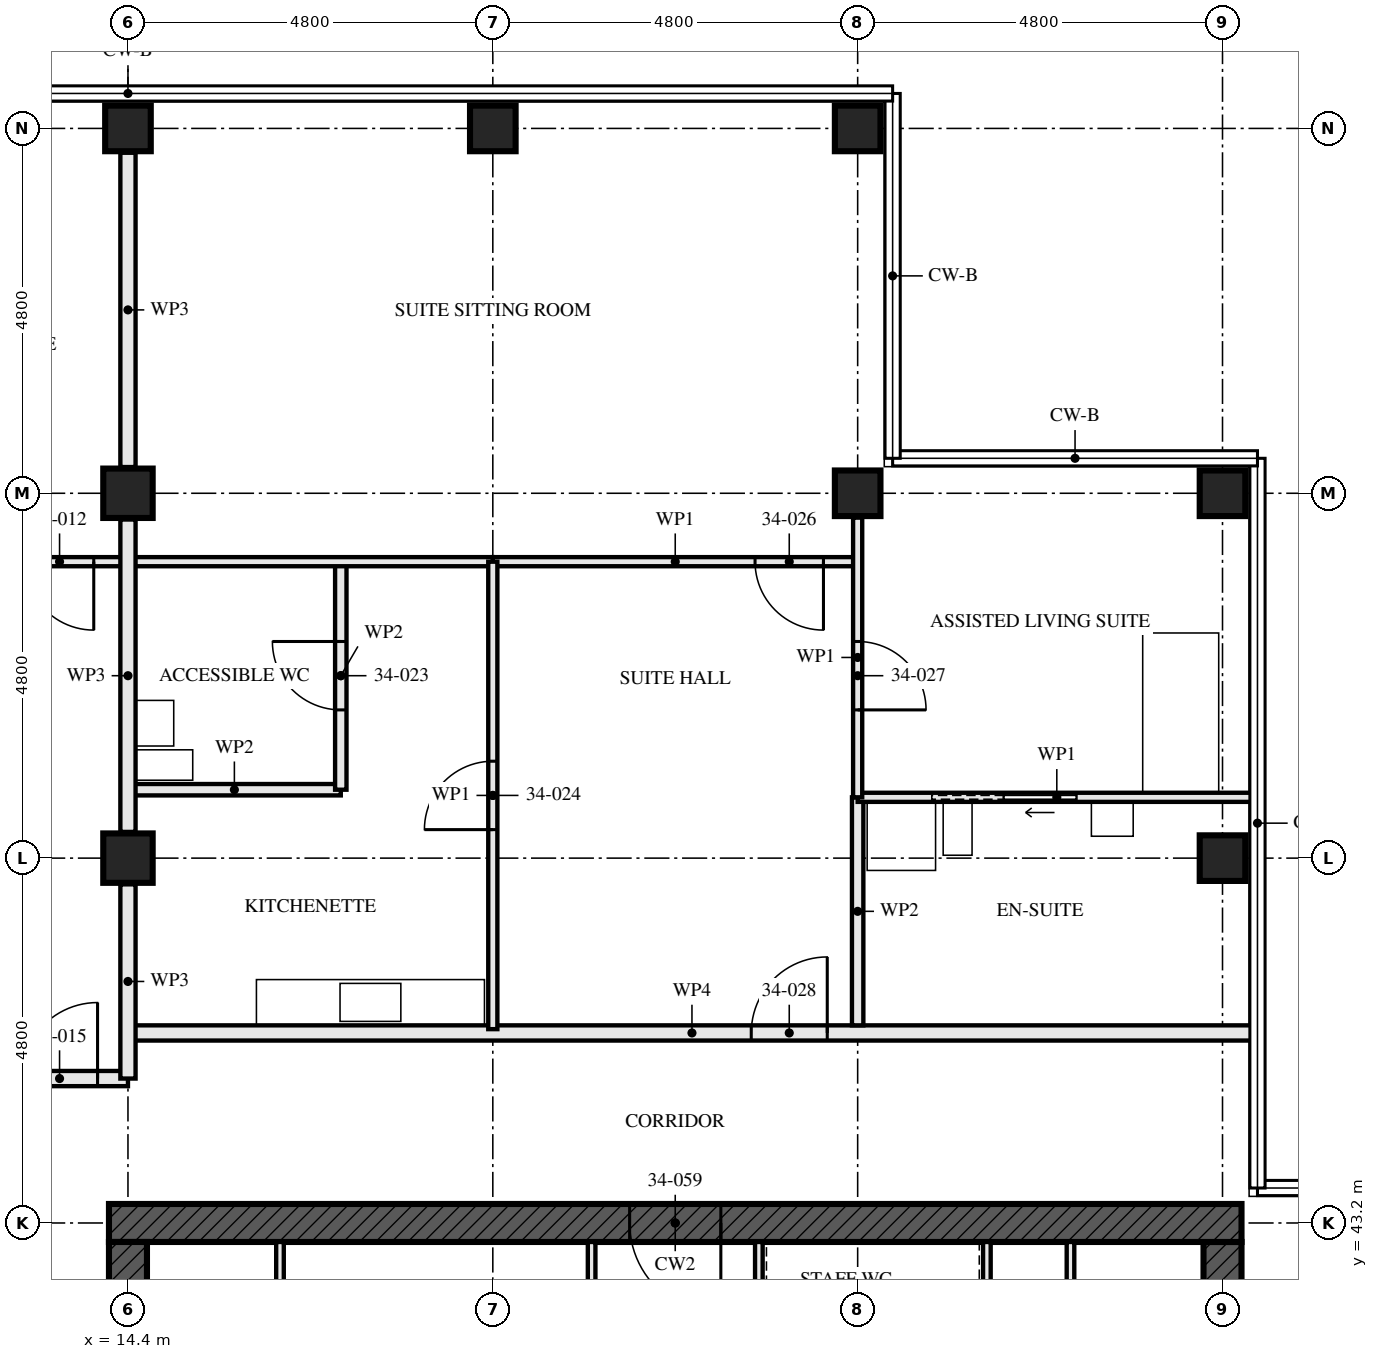
"""IFC4 building model, lengths in metres.
Left out: names, types, materials, properties, quantities, classifications, styles, units other than length and angle.
Written with IfcOpenShell. Run it as: python <this file> out.ifc"""

import sys

from ifc_helpers import new_model, si_unit, direction, frame, frame_2d, origin, origin_2d, place, context, subcontext, project, spatial, rectangle, hollow_rectangle, extrude, element, fill, save


model = new_model("IFC4")
c1 = context("Model", 3, precision=1e-05, world=origin(), true_north=direction((0.0, 1.0)))
c2 = subcontext(c1, "Body", "Model", "MODEL_VIEW")
j1 = project(units=[si_unit("LENGTHUNIT", "METRE"), si_unit("PLANEANGLEUNIT", "RADIAN")], contexts=[c1])
p1 = place(None, origin())
s1 = spatial("IfcSite", under=j1, at=p1, CompositionType="ELEMENT")
p2 = place(p1, origin())
s2 = spatial("IfcBuilding", under=s1, at=p2, CompositionType="ELEMENT")
p3 = place(p2, frame((0.0, 0.0, 126.0)))
s3 = spatial("IfcBuildingStorey", under=s2, at=p3, CompositionType="ELEMENT", Elevation=126.0)
for number, where, z_axis, x_axis in (
    (1, (14.4, 48.0, 0.0), (0.0, 0.0, 1.0), (1.0, 0.0, 0.0)),
    (2, (14.4, 52.8, 0.0), (0.0, 0.0, 1.0), (1.0, 0.0, 0.0)),
):
    element("IfcColumn", number, at=place(p3, frame(where, z_axis=z_axis, x_axis=x_axis)), inside=s3, PredefinedType="COLUMN", context=c2, shape_type="SweptSolid", body=[
        extrude(hollow_rectangle(XDim=0.65, YDim=0.65, WallThickness=0.05, at=origin_2d()), origin(), (0.0, 0.0, 1.0), 3.5),
    ])
for number, where, z_axis, x_axis in (
    (3, (14.4, 57.6, 0.0), (0.0, 0.0, 1.0), (0.0, 1.0, 0.0)),
    (4, (19.2, 57.6, 0.0), (0.0, 0.0, 1.0), (0.0, 1.0, 0.0)),
    (5, (24.0, 52.8, 0.0), (0.0, 0.0, 1.0), (0.0, 1.0, 0.0)),
    (6, (24.0, 57.6, 0.0), (0.0, 0.0, 1.0), (0.0, 1.0, 0.0)),
    (7, (28.8, 48.0, 0.0), (0.0, 0.0, 1.0), (1.0, 0.0, 0.0)),
    (8, (28.8, 52.8, 0.0), (0.0, 0.0, 1.0), (0.0, 1.0, 0.0)),
):
    element("IfcColumn", number, at=place(p3, frame(where, z_axis=z_axis, x_axis=x_axis)), inside=s3, PredefinedType="COLUMN", context=c2, shape_type="SweptSolid", body=[
        extrude(hollow_rectangle(XDim=0.6, YDim=0.6, WallThickness=0.08, at=origin_2d()), origin(), (0.0, 0.0, 1.0), 3.5),
    ])
p4 = place(p3, frame((29.05, 43.2, -0.17), z_axis=(0.0, 0.0, 1.0), x_axis=(-1.0, 0.0, 0.0)))
e9 = element("IfcWall", 9, at=p4, inside=s3, PredefinedType="SHEAR", context=c2, shape_type="SweptSolid", body=[
    extrude(rectangle(XDim=14.9, YDim=0.5, at=frame_2d((7.45, 0.0))), origin(), (0.0, 0.0, 1.0), 3.5),
])
p5 = place(p4, frame((6.85, 0.0, 0.17)))
e10 = element("IfcOpeningElement", 10, at=p5, cuts=e9, PredefinedType="OPENING", context=c2, shape_type="SweptSolid", body=[
    extrude(rectangle(XDim=1.2, YDim=2.1, at=frame_2d((0.6, 1.05))), frame((0.0, 0.26, 0.0), z_axis=(0.0, -1.0, 0.0), x_axis=(1.0, 0.0, 0.0)), (0.0, 0.0, 1.0), 0.521),
])
p6 = place(p3, frame((14.4, 42.95, -0.17), z_axis=(0.0, 0.0, 1.0), x_axis=(0.0, -1.0, 0.0)))
e11 = element("IfcWall", 11, at=p6, inside=s3, PredefinedType="SHEAR", context=c2, shape_type="SweptSolid", body=[
    extrude(rectangle(XDim=13.9, YDim=0.5, at=frame_2d((6.95, 0.0))), origin(), (0.0, 0.0, 1.0), 3.5),
])
p7 = place(p6, frame((6.35, 0.0, 0.17)))
e12 = element("IfcOpeningElement", 12, at=p7, cuts=e11, PredefinedType="OPENING", context=c2, shape_type="SweptSolid", body=[
    extrude(rectangle(XDim=1.2, YDim=2.1, at=frame_2d((0.6, 1.05))), frame((0.0, 0.26, 0.0), z_axis=(0.0, -1.0, 0.0), x_axis=(1.0, 0.0, 0.0)), (0.0, 0.0, 1.0), 0.521),
])
p8 = place(p3, frame((28.8, 29.05, -0.17), z_axis=(0.0, 0.0, 1.0), x_axis=(0.0, 1.0, 0.0)))
e13 = element("IfcWall", 13, at=p8, inside=s3, PredefinedType="SHEAR", context=c2, shape_type="SweptSolid", body=[
    extrude(rectangle(XDim=13.9, YDim=0.5, at=frame_2d((6.95, 0.0))), origin(), (0.0, 0.0, 1.0), 3.5),
])
p9 = place(p8, frame((6.35, 0.0, 0.17)))
e14 = element("IfcOpeningElement", 14, at=p9, cuts=e13, PredefinedType="OPENING", context=c2, shape_type="SweptSolid", body=[
    extrude(rectangle(XDim=1.2, YDim=2.1, at=frame_2d((0.6, 1.05))), frame((0.0, 0.26, 0.0), z_axis=(0.0, -1.0, 0.0), x_axis=(1.0, 0.0, 0.0)), (0.0, 0.0, 1.0), 0.521),
])
p10 = place(p3, frame((14.4, 51.9, 0.0), z_axis=(0.0, 0.0, 1.0), x_axis=(-1.0, 0.0, 0.0)))
e15 = element("IfcWall", 15, at=p10, inside=s3, PredefinedType="PARTITIONING", context=c2, shape_type="SweptSolid", body=[
    extrude(rectangle(XDim=4.8, YDim=0.12, at=frame_2d((2.4, 0.0))), origin(), (0.0, 0.0, 1.0), 3.33),
])
p11 = place(p10, frame((0.45, 0.0, 0.0)))
e16 = element("IfcOpeningElement", 16, at=p11, cuts=e15, PredefinedType="OPENING", context=c2, shape_type="SweptSolid", body=[
    extrude(rectangle(XDim=0.9, YDim=2.1, at=frame_2d((0.45, 1.05))), frame((0.0, 0.071, 0.0), z_axis=(0.0, -1.0, 0.0), x_axis=(1.0, 0.0, 0.0)), (0.0, 0.0, 1.0), 0.141),
])
p12 = place(p10, frame((2.925, 0.0, 0.0)))
e17 = element("IfcOpeningElement", 17, at=p12, cuts=e15, PredefinedType="OPENING", context=c2, shape_type="SweptSolid", body=[
    extrude(rectangle(XDim=0.95, YDim=2.1, at=frame_2d((0.475, 1.05))), frame((0.0, 0.071, 0.0), z_axis=(0.0, -1.0, 0.0), x_axis=(1.0, 0.0, 0.0)), (0.0, 0.0, 1.0), 0.141),
])
p13 = place(p3, frame((14.4, 45.1, 0.0), z_axis=(0.0, 0.0, 1.0), x_axis=(-1.0, 0.0, 0.0)))
e18 = element("IfcWall", 18, at=p13, inside=s3, PredefinedType="PARTITIONING", context=c2, shape_type="SweptSolid", body=[
    extrude(rectangle(XDim=9.6, YDim=0.2, at=frame_2d((4.8, 0.0))), origin(), (0.0, 0.0, 1.0), 3.33),
])
p14 = place(p13, frame((0.4, 0.0, 0.0)))
e19 = element("IfcOpeningElement", 19, at=p14, cuts=e18, PredefinedType="OPENING", context=c2, shape_type="SweptSolid", body=[
    extrude(rectangle(XDim=1.0, YDim=2.1, at=frame_2d((0.5, 1.05))), frame((0.0, 0.111, 0.0), z_axis=(0.0, -1.0, 0.0), x_axis=(1.0, 0.0, 0.0)), (0.0, 0.0, 1.0), 0.221),
])
p15 = place(p3, frame((24.0, 48.8, 0.0), z_axis=(0.0, 0.0, 1.0), x_axis=(0.0, -1.0, 0.0)))
e20 = element("IfcWall", 20, at=p15, inside=s3, PredefinedType="PARTITIONING", context=c2, shape_type="SweptSolid", body=[
    extrude(rectangle(XDim=3.0, YDim=0.15, at=frame_2d((1.5, 0.0))), origin(), (0.0, 0.0, 1.0), 2.55),
])
p16 = place(p3, frame((17.2, 51.9, 0.0), z_axis=(0.0, 0.0, 1.0), x_axis=(0.0, -1.0, 0.0)))
e21 = element("IfcWall", 21, at=p16, inside=s3, PredefinedType="PARTITIONING", context=c2, shape_type="SweptSolid", body=[
    extrude(rectangle(XDim=3.0, YDim=0.15, at=frame_2d((1.5, 0.0))), origin(), (0.0, 0.0, 1.0), 3.33),
])
p17 = place(p16, frame((1.05, 0.0, 0.0)))
e22 = element("IfcOpeningElement", 22, at=p17, cuts=e21, PredefinedType="OPENING", context=c2, shape_type="SweptSolid", body=[
    extrude(rectangle(XDim=0.9, YDim=2.1, at=frame_2d((0.45, 1.05))), frame((0.0, 0.085, 0.0), z_axis=(0.0, -1.0, 0.0), x_axis=(1.0, 0.0, 0.0)), (0.0, 0.0, 1.0), 0.171),
])
p18 = place(p3, frame((17.2, 48.9, 0.0), z_axis=(0.0, 0.0, 1.0), x_axis=(-1.0, 0.0, 0.0)))
e23 = element("IfcWall", 23, at=p18, inside=s3, PredefinedType="PARTITIONING", context=c2, shape_type="SweptSolid", body=[
    extrude(rectangle(XDim=2.8, YDim=0.15, at=frame_2d((1.4, 0.0))), origin(), (0.0, 0.0, 1.0), 3.33),
])
p19 = place(p3, frame((19.2, 51.9, 0.0), z_axis=(0.0, 0.0, 1.0), x_axis=(0.0, -1.0, 0.0)))
e24 = element("IfcWall", 24, at=p19, inside=s3, PredefinedType="PARTITIONING", context=c2, shape_type="SweptSolid", body=[
    extrude(rectangle(XDim=6.15, YDim=0.12, at=frame_2d((3.075, 0.0))), origin(), (0.0, 0.0, 1.0), 2.55),
])
p20 = place(p19, frame((2.625, 0.0, 0.0)))
e25 = element("IfcOpeningElement", 25, at=p20, cuts=e24, PredefinedType="OPENING", context=c2, shape_type="SweptSolid", body=[
    extrude(rectangle(XDim=0.9, YDim=2.1, at=frame_2d((0.45, 1.05))), frame((0.0, 0.071, 0.0), z_axis=(0.0, -1.0, 0.0), x_axis=(1.0, 0.0, 0.0)), (0.0, 0.0, 1.0), 0.141),
])
p21 = place(p3, frame((29.24, 48.8, 0.0), z_axis=(0.0, 0.0, 1.0), x_axis=(-1.0, 0.0, 0.0)))
e26 = element("IfcWall", 26, at=p21, inside=s3, PredefinedType="PARTITIONING", context=c2, shape_type="SweptSolid", body=[
    extrude(rectangle(XDim=5.24, YDim=0.12, at=frame_2d((2.62, 0.0))), origin(), (0.0, 0.0, 1.0), 2.32),
])
p22 = place(p21, frame((2.365, 0.0, 0.0)))
e27 = element("IfcOpeningElement", 27, at=p22, cuts=e26, PredefinedType="OPENING", context=c2, shape_type="SweptSolid", body=[
    extrude(rectangle(XDim=0.95, YDim=2.1, at=frame_2d((0.475, 1.05))), frame((0.0, 0.071, 0.0), z_axis=(0.0, -1.0, 0.0), x_axis=(1.0, 0.0, 0.0)), (0.0, 0.0, 1.0), 0.141),
])
p23 = place(p3, frame((24.0, 51.9, 0.0), z_axis=(0.0, 0.0, 1.0), x_axis=(-1.0, 0.0, 0.0)))
e28 = element("IfcWall", 28, at=p23, inside=s3, PredefinedType="PARTITIONING", context=c2, shape_type="SweptSolid", body=[
    extrude(rectangle(XDim=4.8, YDim=0.12, at=frame_2d((2.4, 0.0))), origin(), (0.0, 0.0, 1.0), 3.33),
])
p24 = place(p23, frame((0.45, 0.0, 0.0)))
e29 = element("IfcOpeningElement", 29, at=p24, cuts=e28, PredefinedType="OPENING", context=c2, shape_type="SweptSolid", body=[
    extrude(rectangle(XDim=0.9, YDim=2.1, at=frame_2d((0.45, 1.05))), frame((0.0, 0.071, 0.0), z_axis=(0.0, -1.0, 0.0), x_axis=(1.0, 0.0, 0.0)), (0.0, 0.0, 1.0), 0.141),
])
p25 = place(p3, frame((19.2, 51.9, 0.0), z_axis=(0.0, 0.0, 1.0), x_axis=(-1.0, 0.0, 0.0)))
e30 = element("IfcWall", 30, at=p25, inside=s3, PredefinedType="PARTITIONING", context=c2, shape_type="SweptSolid", body=[
    extrude(rectangle(XDim=4.8, YDim=0.12, at=frame_2d((2.4, 0.0))), origin(), (0.0, 0.0, 1.0), 3.33),
])
p26 = place(p3, frame((24.0, 52.48, 0.0), z_axis=(0.0, 0.0, 1.0), x_axis=(0.0, -1.0, 0.0)))
e31 = element("IfcWall", 31, at=p26, inside=s3, PredefinedType="PARTITIONING", context=c2, shape_type="SweptSolid", body=[
    extrude(rectangle(XDim=3.68, YDim=0.12, at=frame_2d((1.84, 0.0))), origin(), (0.0, 0.0, 1.0), 3.33),
])
p27 = place(p26, frame((1.63, 0.0, 0.0)))
e32 = element("IfcOpeningElement", 32, at=p27, cuts=e31, PredefinedType="OPENING", context=c2, shape_type="SweptSolid", body=[
    extrude(rectangle(XDim=0.9, YDim=2.1, at=frame_2d((0.45, 1.05))), frame((0.0, 0.071, 0.0), z_axis=(0.0, -1.0, 0.0), x_axis=(1.0, 0.0, 0.0)), (0.0, 0.0, 1.0), 0.141),
])
p28 = place(p3, frame((29.24, 45.7, 0.0), z_axis=(0.0, 0.0, 1.0), x_axis=(-1.0, 0.0, 0.0)))
e33 = element("IfcWall", 33, at=p28, inside=s3, PredefinedType="PARTITIONING", context=c2, shape_type="SweptSolid", body=[
    extrude(rectangle(XDim=14.84, YDim=0.2, at=frame_2d((7.42, 0.0))), origin(), (0.0, 0.0, 1.0), 2.32),
])
p29 = place(p28, frame((5.64, 0.0, 0.0)))
e34 = element("IfcOpeningElement", 34, at=p29, cuts=e33, PredefinedType="OPENING", context=c2, shape_type="SweptSolid", body=[
    extrude(rectangle(XDim=1.0, YDim=2.1, at=frame_2d((0.5, 1.05))), frame((0.0, 0.111, 0.0), z_axis=(0.0, -1.0, 0.0), x_axis=(1.0, 0.0, 0.0)), (0.0, 0.0, 1.0), 0.221),
])
for number, where, z_axis, x_axis in (
    (35, (16.4, 37.15, 0.0), (0.0, 0.0, 1.0), (0.0, 1.0, 0.0)),
    (36, (26.8, 37.15, 0.0), (0.0, 0.0, 1.0), (0.0, 1.0, 0.0)),
):
    element("IfcWall", number, at=place(p3, frame(where, z_axis=z_axis, x_axis=x_axis)), inside=s3, PredefinedType="SOLIDWALL", context=c2, shape_type="SweptSolid", body=[
        extrude(rectangle(XDim=5.8, YDim=0.1, at=frame_2d((2.9, 0.0))), origin(), (0.0, 0.0, 1.0), 3.33),
    ])
p30 = place(p3, frame((20.5, 37.15, 0.0), z_axis=(0.0, 0.0, 1.0), x_axis=(0.0, 1.0, 0.0)))
e37 = element("IfcWall", 37, at=p30, inside=s3, PredefinedType="SOLIDWALL", context=c2, shape_type="SweptSolid", body=[
    extrude(rectangle(XDim=5.8, YDim=0.1, at=frame_2d((2.9, 0.0))), origin(), (0.0, 0.0, 1.0), 3.33),
])
p31 = place(p30, frame((0.925, 0.0, 0.0)))
e38 = element("IfcOpeningElement", 38, at=p31, cuts=e37, PredefinedType="OPENING", context=c2, shape_type="SweptSolid", body=[
    extrude(rectangle(XDim=1.0, YDim=2.1, at=frame_2d((0.5, 1.05))), frame((0.0, 0.061, 0.0), z_axis=(0.0, -1.0, 0.0), x_axis=(1.0, 0.0, 0.0)), (0.0, 0.0, 1.0), 0.121),
])
p32 = place(p3, frame((22.7, 37.15, 0.0), z_axis=(0.0, 0.0, 1.0), x_axis=(0.0, 1.0, 0.0)))
e39 = element("IfcWall", 39, at=p32, inside=s3, PredefinedType="SOLIDWALL", context=c2, shape_type="SweptSolid", body=[
    extrude(rectangle(XDim=5.8, YDim=0.1, at=frame_2d((2.9, 0.0))), origin(), (0.0, 0.0, 1.0), 3.33),
])
p33 = place(p32, frame((0.925, 0.0, 0.0)))
e40 = element("IfcOpeningElement", 40, at=p33, cuts=e39, PredefinedType="OPENING", context=c2, shape_type="SweptSolid", body=[
    extrude(rectangle(XDim=1.0, YDim=2.1, at=frame_2d((0.5, 1.05))), frame((0.0, 0.061, 0.0), z_axis=(0.0, -1.0, 0.0), x_axis=(1.0, 0.0, 0.0)), (0.0, 0.0, 1.0), 0.121),
])
p34 = place(p32, frame((3.9, 0.0, 0.0)))
e41 = element("IfcOpeningElement", 41, at=p34, cuts=e39, PredefinedType="OPENING", context=c2, shape_type="SweptSolid", body=[
    extrude(rectangle(XDim=1.0, YDim=2.1, at=frame_2d((0.5, 1.05))), frame((0.0, 0.061, 0.0), z_axis=(0.0, -1.0, 0.0), x_axis=(1.0, 0.0, 0.0)), (0.0, 0.0, 1.0), 0.121),
])
p35 = place(p3, frame((25.7, 37.15, 0.0), z_axis=(0.0, 0.0, 1.0), x_axis=(0.0, 1.0, 0.0)))
e42 = element("IfcWall", 42, at=p35, inside=s3, PredefinedType="SOLIDWALL", context=c2, shape_type="SweptSolid", body=[
    extrude(rectangle(XDim=5.8, YDim=0.1, at=frame_2d((2.9, 0.0))), origin(), (0.0, 0.0, 1.0), 3.33),
])
p36 = place(p3, frame((14.4, 45.1, 0.0), z_axis=(0.0, 0.0, 1.0), x_axis=(0.0, 1.0, 0.0)))
e43 = element("IfcWall", 43, at=p36, inside=s3, PredefinedType="PARTITIONING", context=c2, shape_type="SweptSolid", body=[
    extrude(rectangle(XDim=2.555, YDim=0.2, at=frame_2d((1.277, 0.0))), origin(), (0.0, 0.0, 1.0), 2.32),
])
p37 = place(p3, frame((14.4, 48.345, 0.0), z_axis=(0.0, 0.0, 1.0), x_axis=(0.0, 1.0, 0.0)))
e44 = element("IfcWall", 44, at=p37, inside=s3, PredefinedType="PARTITIONING", context=c2, shape_type="SweptSolid", body=[
    extrude(rectangle(XDim=4.11, YDim=0.2, at=frame_2d((2.055, 0.0))), origin(), (0.0, 0.0, 1.0), 2.32),
])
p38 = place(p3, frame((14.4, 53.145, 0.0), z_axis=(0.0, 0.0, 1.0), x_axis=(0.0, 1.0, 0.0)))
e45 = element("IfcWall", 45, at=p38, inside=s3, PredefinedType="PARTITIONING", context=c2, shape_type="SweptSolid", body=[
    extrude(rectangle(XDim=4.135, YDim=0.2, at=frame_2d((2.067, 0.0))), origin(), (0.0, 0.0, 1.0), 2.32),
])
p39 = place(p11, origin())
e46 = element("IfcDoor", 46, at=p39, inside=s3, OperationType="SINGLE_SWING_RIGHT", PredefinedType="DOOR", context=c2, shape_type="SweptSolid", body=[
    extrude(rectangle(XDim=0.9, YDim=2.1, at=frame_2d((0.45, 1.05))), frame((0.0, 0.022, 0.0), z_axis=(0.0, -1.0, 0.0), x_axis=(1.0, 0.0, 0.0)), (0.0, 0.0, 1.0), 0.044),
])
fill(e16, e46)
p40 = place(p14, frame((1.0, 0.0, 0.0), z_axis=(0.0, 0.0, 1.0), x_axis=(-1.0, 0.0, 0.0)))
e47 = element("IfcDoor", 47, at=p40, inside=s3, OperationType="SINGLE_SWING_LEFT", PredefinedType="DOOR", context=c2, shape_type="SweptSolid", body=[
    extrude(rectangle(XDim=1.0, YDim=2.1, at=frame_2d((0.5, 1.05))), frame((0.0, 0.027, 0.0), z_axis=(0.0, -1.0, 0.0), x_axis=(1.0, 0.0, 0.0)), (0.0, 0.0, 1.0), 0.054),
])
fill(e19, e47)
p41 = place(p17, frame((0.9, 0.0, 0.0), z_axis=(0.0, 0.0, 1.0), x_axis=(-1.0, 0.0, 0.0)))
e48 = element("IfcDoor", 48, at=p41, inside=s3, OperationType="SINGLE_SWING_LEFT", PredefinedType="DOOR", context=c2, shape_type="SweptSolid", body=[
    extrude(rectangle(XDim=0.9, YDim=2.1, at=frame_2d((0.45, 1.05))), frame((0.0, 0.022, 0.0), z_axis=(0.0, -1.0, 0.0), x_axis=(1.0, 0.0, 0.0)), (0.0, 0.0, 1.0), 0.044),
])
fill(e22, e48)
p42 = place(p20, frame((0.9, 0.0, 0.0), z_axis=(0.0, 0.0, 1.0), x_axis=(-1.0, 0.0, 0.0)))
e49 = element("IfcDoor", 49, at=p42, inside=s3, OperationType="SINGLE_SWING_RIGHT", PredefinedType="DOOR", context=c2, shape_type="SweptSolid", body=[
    extrude(rectangle(XDim=0.9, YDim=2.1, at=frame_2d((0.45, 1.05))), frame((0.0, 0.022, 0.0), z_axis=(0.0, -1.0, 0.0), x_axis=(1.0, 0.0, 0.0)), (0.0, 0.0, 1.0), 0.044),
])
fill(e25, e49)
p43 = place(p22, origin())
e50 = element("IfcDoor", 50, at=p43, inside=s3, OperationType="SLIDING_TO_LEFT", PredefinedType="DOOR", context=c2, shape_type="SweptSolid", body=[
    extrude(rectangle(XDim=0.95, YDim=2.1, at=frame_2d((0.475, 1.05))), frame((0.0, 0.022, 0.0), z_axis=(0.0, -1.0, 0.0), x_axis=(1.0, 0.0, 0.0)), (0.0, 0.0, 1.0), 0.044),
])
fill(e27, e50)
p44 = place(p24, origin())
e51 = element("IfcDoor", 51, at=p44, inside=s3, OperationType="SINGLE_SWING_RIGHT", PredefinedType="DOOR", context=c2, shape_type="SweptSolid", body=[
    extrude(rectangle(XDim=0.9, YDim=2.1, at=frame_2d((0.45, 1.05))), frame((0.0, 0.022, 0.0), z_axis=(0.0, -1.0, 0.0), x_axis=(1.0, 0.0, 0.0)), (0.0, 0.0, 1.0), 0.044),
])
fill(e29, e51)
p45 = place(p27, origin())
e52 = element("IfcDoor", 52, at=p45, inside=s3, OperationType="SINGLE_SWING_LEFT", PredefinedType="DOOR", context=c2, shape_type="SweptSolid", body=[
    extrude(rectangle(XDim=0.9, YDim=2.1, at=frame_2d((0.45, 1.05))), frame((0.0, 0.022, 0.0), z_axis=(0.0, -1.0, 0.0), x_axis=(1.0, 0.0, 0.0)), (0.0, 0.0, 1.0), 0.044),
])
fill(e32, e52)
p46 = place(p29, frame((1.0, 0.0, 0.0), z_axis=(0.0, 0.0, 1.0), x_axis=(-1.0, 0.0, 0.0)))
e53 = element("IfcDoor", 53, at=p46, inside=s3, OperationType="SINGLE_SWING_LEFT", PredefinedType="DOOR", context=c2, shape_type="SweptSolid", body=[
    extrude(rectangle(XDim=1.0, YDim=2.1, at=frame_2d((0.5, 1.05))), frame((0.0, 0.027, 0.0), z_axis=(0.0, -1.0, 0.0), x_axis=(1.0, 0.0, 0.0)), (0.0, 0.0, 1.0), 0.054),
])
fill(e34, e53)
p47 = place(p5, origin())
e54 = element("IfcDoor", 54, at=p47, inside=s3, OperationType="SINGLE_SWING_LEFT", PredefinedType="DOOR", context=c2, shape_type="SweptSolid", body=[
    extrude(rectangle(XDim=1.2, YDim=2.1, at=frame_2d((0.6, 1.05))), frame((0.0, 0.027, 0.0), z_axis=(0.0, -1.0, 0.0), x_axis=(1.0, 0.0, 0.0)), (0.0, 0.0, 1.0), 0.054),
])
fill(e10, e54)
save(model, sys.argv[1])
